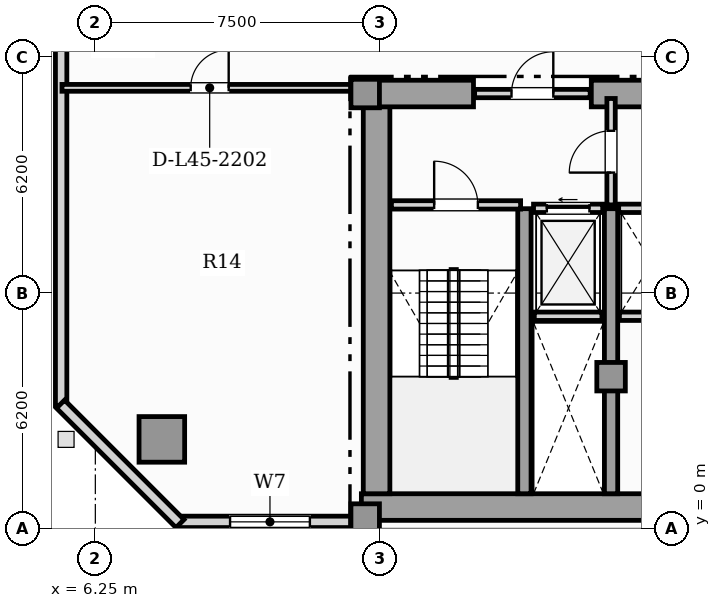
"""IFC4 building model, lengths in metres.
Left out: names, types, materials, properties, quantities, classifications, styles, units other than length and angle.
Written with IfcOpenShell. Run it as: python <this file> out.ifc"""

import sys

from ifc_helpers import new_model, si_unit, direction, frame, frame_2d, origin, origin_2d, place, context, subcontext, project, spatial, rectangle, hollow_rectangle, extrude, element, fill, save


model = new_model("IFC4")
c1 = context("Model", 3, precision=1e-05, world=origin(), true_north=direction((0.0, 1.0)))
c2 = subcontext(c1, "Body", "Model", "MODEL_VIEW")
j1 = project(units=[si_unit("LENGTHUNIT", "METRE"), si_unit("PLANEANGLEUNIT", "RADIAN")], contexts=[c1])
p1 = place(None, origin())
s1 = spatial("IfcSite", under=j1, at=p1, CompositionType="ELEMENT")
p2 = place(p1, origin())
s2 = spatial("IfcBuilding", under=s1, at=p2, CompositionType="ELEMENT")
p3 = place(p2, frame((0.0, 0.0, 183.7)))
s3 = spatial("IfcBuildingStorey", under=s2, at=p3, CompositionType="ELEMENT", Elevation=183.7)
p4 = place(p3, frame((13.25, 0.57, 0.0), z_axis=(0.0, 0.0, 1.0), x_axis=(1.0, 0.0, 0.0)))
e1 = element("IfcWall", 1, at=p4, inside=s3, PredefinedType="SHEAR", context=c2, shape_type="SweptSolid", body=[
    extrude(rectangle(XDim=31.0, YDim=0.7, at=frame_2d((15.5, 0.0))), origin(), (0.0, 0.0, 1.0), 3.63),
])
p5 = place(p3, frame((13.65, 0.92, 0.0), z_axis=(0.0, 0.0, 1.0), x_axis=(0.0, 1.0, 0.0)))
e2 = element("IfcWall", 2, at=p5, inside=s3, PredefinedType="SHEAR", context=c2, shape_type="SweptSolid", body=[
    extrude(rectangle(XDim=10.53, YDim=0.7, at=frame_2d((5.265, 0.0))), origin(), (0.0, 0.0, 1.0), 3.63),
])
p6 = place(p3, frame((13.25, 11.45, 0.0), z_axis=(0.0, 0.0, 1.0), x_axis=(1.0, 0.0, 0.0)))
e3 = element("IfcWall", 3, at=p6, inside=s3, PredefinedType="SHEAR", context=c2, shape_type="SweptSolid", body=[
    extrude(rectangle(XDim=2.95, YDim=0.7, at=frame_2d((1.475, 0.0))), origin(), (0.0, 0.0, 1.0), 3.63),
])
p7 = place(p3, frame((19.3, 11.45, 0.0), z_axis=(0.0, 0.0, 1.0), x_axis=(1.0, 0.0, 0.0)))
e4 = element("IfcWall", 4, at=p7, inside=s3, PredefinedType="SHEAR", context=c2, shape_type="SweptSolid", body=[
    extrude(rectangle(XDim=7.3, YDim=0.7, at=frame_2d((3.65, 0.0))), origin(), (0.0, 0.0, 1.0), 3.63),
])
for number, where, z_axis, x_axis in (
    (5, (17.54, 0.92, 0.0), (0.0, 0.0, 1.0), (0.0, 1.0, 0.0)),
    (6, (19.82, 0.92, 0.0), (0.0, 0.0, 1.0), (0.0, 1.0, 0.0)),
):
    element("IfcWall", number, at=place(p3, frame(where, z_axis=z_axis, x_axis=x_axis)), inside=s3, PredefinedType="SHEAR", context=c2, shape_type="SweptSolid", body=[
        extrude(rectangle(XDim=7.5, YDim=0.35, at=frame_2d((3.75, 0.0))), origin(), (0.0, 0.0, 1.0), 3.63),
    ])
for number, where, z_axis, x_axis in (
    (7, (13.35, 0.28, 0.0), (0.0, 0.0, 1.0), (1.0, 0.0, 0.0)),
    (8, (13.35, 11.45, 0.0), (0.0, 0.0, 1.0), (1.0, 0.0, 0.0)),
    (9, (19.82, 4.0, 0.0), (0.0, 0.0, 1.0), (1.0, 0.0, 0.0)),
):
    element("IfcColumn", number, at=place(p3, frame(where, z_axis=z_axis, x_axis=x_axis)), inside=s3, PredefinedType="COLUMN", context=c2, shape_type="SweptSolid", body=[
        extrude(rectangle(XDim=0.75, YDim=0.75, at=origin_2d()), origin(), (0.0, 0.0, 1.0), 3.85),
    ])
p8 = place(p3, frame((8.0, 2.35, 0.0), z_axis=(0.0, 0.0, 1.0), x_axis=(1.0, 0.0, 0.0)))
e10 = element("IfcColumn", 10, at=p8, inside=s3, PredefinedType="USERDEFINED", context=c2, shape_type="SweptSolid", body=[
    extrude(hollow_rectangle(XDim=1.2, YDim=1.2, WallThickness=0.07, at=origin_2d()), origin(), (0.0, 0.0, 1.0), 3.85),
])
p9 = place(p3, frame((8.44, 0.18, 0.0), z_axis=(0.0, 0.0, 1.0), x_axis=(1.0, 0.0, 0.0)))
e11 = element("IfcWall", 11, at=p9, inside=s3, PredefinedType="SOLIDWALL", context=c2, shape_type="SweptSolid", body=[
    extrude(rectangle(XDim=4.81, YDim=0.3, at=frame_2d((2.405, 0.0))), origin(), (0.0, 0.0, 1.0), 3.63),
])
p10 = place(p9, frame((1.355, 0.0, 0.85)))
e12 = element("IfcOpeningElement", 12, at=p10, cuts=e11, PredefinedType="OPENING", context=c2, shape_type="SweptSolid", body=[
    extrude(rectangle(XDim=2.1, YDim=2.05, at=frame_2d((1.05, 1.025))), frame((0.0, 0.16, 0.0), z_axis=(0.0, -1.0, 0.0), x_axis=(1.0, 0.0, 0.0)), (0.0, 0.0, 1.0), 0.32),
])
p11 = place(p3, frame((5.35, 37.16, 0.0), z_axis=(0.0, 0.0, 1.0), x_axis=(0.0, -1.0, 0.0)))
e13 = element("IfcWall", 13, at=p11, inside=s3, PredefinedType="SOLIDWALL", context=c2, shape_type="SweptSolid", body=[
    extrude(rectangle(XDim=33.92, YDim=0.3, at=frame_2d((16.96, 0.0))), origin(), (0.0, 0.0, 1.0), 3.63),
])
p12 = place(p11, frame((2.46, 0.0, 0.95)))
e14 = element("IfcOpeningElement", 14, at=p12, cuts=e13, PredefinedType="OPENING", context=c2, shape_type="SweptSolid", body=[
    extrude(rectangle(XDim=0.9, YDim=1.5, at=frame_2d((0.45, 0.75))), frame((0.0, 0.16, 0.0), z_axis=(0.0, -1.0, 0.0), x_axis=(1.0, 0.0, 0.0)), (0.0, 0.0, 1.0), 0.32),
])
p13 = place(p11, frame((11.241, 0.0, 0.88)))
e15 = element("IfcOpeningElement", 15, at=p13, cuts=e13, PredefinedType="OPENING", context=c2, shape_type="SweptSolid", body=[
    extrude(rectangle(XDim=1.65, YDim=2.0, at=frame_2d((0.825, 1.0))), frame((0.0, 0.16, 0.0), z_axis=(0.0, -1.0, 0.0), x_axis=(1.0, 0.0, 0.0)), (0.0, 0.0, 1.0), 0.32),
])
p14 = place(p3, frame((5.334, 3.278, 0.0), z_axis=(0.0, 0.0, 1.0), x_axis=(0.707106781187, -0.707106781187, 0.0)))
e16 = element("IfcWall", 16, at=p14, inside=s3, PredefinedType="SOLIDWALL", context=c2, shape_type="SweptSolid", body=[
    extrude(rectangle(XDim=4.445, YDim=0.3, at=frame_2d((2.223, 0.0))), origin(), (0.0, 0.0, 1.0), 3.63),
])
p15 = place(p3, frame((17.8, 5.59, 0.0), z_axis=(0.0, 0.0, 1.0), x_axis=(1.0, 0.0, 0.0)))
e17 = element("IfcWall", 17, at=p15, inside=s3, PredefinedType="SOLIDWALL", context=c2, shape_type="SweptSolid", body=[
    extrude(rectangle(XDim=1.78, YDim=0.22, at=frame_2d((0.89, 0.0))), origin(), (0.0, 0.0, 1.0), 3.63),
])
p16 = place(p3, frame((17.78, 8.43, 0.0), z_axis=(0.0, 0.0, 1.0), x_axis=(1.0, 0.0, 0.0)))
e18 = element("IfcWall", 18, at=p16, inside=s3, PredefinedType="SOLIDWALL", context=c2, shape_type="SweptSolid", body=[
    extrude(rectangle(XDim=1.82, YDim=0.22, at=frame_2d((0.91, 0.0))), origin(), (0.0, 0.0, 1.0), 3.63),
])
p17 = place(p16, frame((0.35, 0.0, 0.0)))
e19 = element("IfcOpeningElement", 19, at=p17, cuts=e18, PredefinedType="OPENING", context=c2, shape_type="SweptSolid", body=[
    extrude(rectangle(XDim=1.12, YDim=2.25, at=frame_2d((0.56, 1.125))), frame((0.0, 0.12, 0.0), z_axis=(0.0, -1.0, 0.0), x_axis=(1.0, 0.0, 0.0)), (0.0, 0.0, 1.0), 0.24),
])
p18 = place(p3, frame((20.04, 5.59, 0.0), z_axis=(0.0, 0.0, 1.0), x_axis=(1.0, 0.0, 0.0)))
e20 = element("IfcWall", 20, at=p18, inside=s3, PredefinedType="SOLIDWALL", context=c2, shape_type="SweptSolid", body=[
    extrude(rectangle(XDim=1.7, YDim=0.22, at=frame_2d((0.85, 0.0))), origin(), (0.0, 0.0, 1.0), 3.63),
])
p19 = place(p3, frame((20.02, 8.43, 0.0), z_axis=(0.0, 0.0, 1.0), x_axis=(1.0, 0.0, 0.0)))
e21 = element("IfcWall", 21, at=p19, inside=s3, PredefinedType="SOLIDWALL", context=c2, shape_type="SweptSolid", body=[
    extrude(rectangle(XDim=1.74, YDim=0.22, at=frame_2d((0.87, 0.0))), origin(), (0.0, 0.0, 1.0), 3.63),
])
p20 = place(p3, frame((14.04, 8.52, 0.0), z_axis=(0.0, 0.0, 1.0), x_axis=(1.0, 0.0, 0.0)))
e22 = element("IfcWall", 22, at=p20, inside=s3, PredefinedType="SOLIDWALL", context=c2, shape_type="SweptSolid", body=[
    extrude(rectangle(XDim=3.4, YDim=0.22, at=frame_2d((1.7, 0.0))), origin(), (0.0, 0.0, 1.0), 3.63),
])
p21 = place(p20, frame((1.125, 0.0, 0.0)))
e23 = element("IfcOpeningElement", 23, at=p21, cuts=e22, PredefinedType="OPENING", context=c2, shape_type="SweptSolid", body=[
    extrude(rectangle(XDim=1.15, YDim=2.2, at=frame_2d((0.575, 1.1))), frame((0.0, 0.12, 0.0), z_axis=(0.0, -1.0, 0.0), x_axis=(1.0, 0.0, 0.0)), (0.0, 0.0, 1.0), 0.24),
])
p22 = place(p3, frame((19.82, 8.52, 0.0), z_axis=(0.0, 0.0, 1.0), x_axis=(0.0, 1.0, 0.0)))
e24 = element("IfcWall", 24, at=p22, inside=s3, PredefinedType="SOLIDWALL", context=c2, shape_type="SweptSolid", body=[
    extrude(rectangle(XDim=2.8, YDim=0.22, at=frame_2d((1.4, 0.0))), origin(), (0.0, 0.0, 1.0), 3.085),
])
p23 = place(p22, frame((0.85, 0.0, 0.0)))
e25 = element("IfcOpeningElement", 25, at=p23, cuts=e24, PredefinedType="OPENING", context=c2, shape_type="SweptSolid", body=[
    extrude(rectangle(XDim=1.1, YDim=2.2, at=frame_2d((0.55, 1.1))), frame((0.0, 0.12, 0.0), z_axis=(0.0, -1.0, 0.0), x_axis=(1.0, 0.0, 0.0)), (0.0, 0.0, 1.0), 0.24),
])
p24 = place(p3, frame((16.23, 11.45, 0.0), z_axis=(0.0, 0.0, 1.0), x_axis=(1.0, 0.0, 0.0)))
e26 = element("IfcWall", 26, at=p24, inside=s3, PredefinedType="SOLIDWALL", context=c2, shape_type="SweptSolid", body=[
    extrude(rectangle(XDim=3.04, YDim=0.22, at=frame_2d((1.52, 0.0))), origin(), (0.0, 0.0, 1.0), 3.63),
])
p25 = place(p24, frame((0.97, 0.0, 0.0)))
e27 = element("IfcOpeningElement", 27, at=p25, cuts=e26, PredefinedType="OPENING", context=c2, shape_type="SweptSolid", body=[
    extrude(rectangle(XDim=1.1, YDim=2.2, at=frame_2d((0.55, 1.1))), frame((0.0, 0.12, 0.0), z_axis=(0.0, -1.0, 0.0), x_axis=(1.0, 0.0, 0.0)), (0.0, 0.0, 1.0), 0.24),
])
p26 = place(p3, frame((5.373, 11.6, 0.0), z_axis=(0.0, 0.0, 1.0), x_axis=(1.0, 0.0, 0.0)))
e28 = element("IfcWall", 28, at=p26, inside=s3, PredefinedType="PARTITIONING", context=c2, shape_type="SweptSolid", body=[
    extrude(rectangle(XDim=7.772, YDim=0.18, at=frame_2d((3.886, 0.0))), origin(), (0.0, 0.0, 1.0), 3.63),
])
p27 = place(p26, frame((3.386, 0.0, 0.0)))
e29 = element("IfcOpeningElement", 29, at=p27, cuts=e28, PredefinedType="OPENING", context=c2, shape_type="SweptSolid", body=[
    extrude(rectangle(XDim=1.0, YDim=2.15, at=frame_2d((0.5, 1.075))), frame((0.0, 0.1, 0.0), z_axis=(0.0, -1.0, 0.0), x_axis=(1.0, 0.0, 0.0)), (0.0, 0.0, 1.0), 0.2),
])
p28 = place(p10, origin())
e30 = element("IfcWindow", 30, at=p28, inside=s3, PartitioningType="SINGLE_PANEL", PredefinedType="WINDOW", context=c2, shape_type="SweptSolid", body=[
    extrude(rectangle(XDim=2.1, YDim=2.05, at=frame_2d((1.05, 1.025))), frame((0.0, 0.03, 0.0), z_axis=(0.0, -1.0, 0.0), x_axis=(1.0, 0.0, 0.0)), (0.0, 0.0, 1.0), 0.06),
])
fill(e12, e30)
p29 = place(p17, origin())
e31 = element("IfcDoor", 31, at=p29, inside=s3, OperationType="SLIDING_TO_LEFT", PredefinedType="DOOR", context=c2, shape_type="SweptSolid", body=[
    extrude(rectangle(XDim=1.12, YDim=2.25, at=frame_2d((0.56, 1.125))), frame((0.0, 0.025, 0.0), z_axis=(0.0, -1.0, 0.0), x_axis=(1.0, 0.0, 0.0)), (0.0, 0.0, 1.0), 0.05),
])
fill(e19, e31)
p30 = place(p21, origin())
e32 = element("IfcDoor", 32, at=p30, inside=s3, OperationType="SINGLE_SWING_LEFT", PredefinedType="DOOR", context=c2, shape_type="SweptSolid", body=[
    extrude(rectangle(XDim=1.15, YDim=2.2, at=frame_2d((0.575, 1.1))), frame((0.0, 0.025, 0.0), z_axis=(0.0, -1.0, 0.0), x_axis=(1.0, 0.0, 0.0)), (0.0, 0.0, 1.0), 0.05),
])
fill(e23, e32)
p31 = place(p23, origin())
e33 = element("IfcDoor", 33, at=p31, inside=s3, OperationType="SINGLE_SWING_LEFT", PredefinedType="DOOR", context=c2, shape_type="SweptSolid", body=[
    extrude(rectangle(XDim=1.1, YDim=2.2, at=frame_2d((0.55, 1.1))), frame((0.0, 0.025, 0.0), z_axis=(0.0, -1.0, 0.0), x_axis=(1.0, 0.0, 0.0)), (0.0, 0.0, 1.0), 0.05),
])
fill(e25, e33)
p32 = place(p25, origin())
e34 = element("IfcDoor", 34, at=p32, inside=s3, OperationType="SINGLE_SWING_RIGHT", PredefinedType="DOOR", context=c2, shape_type="SweptSolid", body=[
    extrude(rectangle(XDim=1.1, YDim=2.2, at=frame_2d((0.55, 1.1))), frame((0.0, 0.025, 0.0), z_axis=(0.0, -1.0, 0.0), x_axis=(1.0, 0.0, 0.0)), (0.0, 0.0, 1.0), 0.05),
])
fill(e27, e34)
p33 = place(p27, origin())
e35 = element("IfcDoor", 35, at=p33, inside=s3, OperationType="SINGLE_SWING_RIGHT", PredefinedType="DOOR", context=c2, shape_type="SweptSolid", body=[
    extrude(rectangle(XDim=1.0, YDim=2.15, at=frame_2d((0.5, 1.075))), frame((0.0, 0.025, 0.0), z_axis=(0.0, -1.0, 0.0), x_axis=(1.0, 0.0, 0.0)), (0.0, 0.0, 1.0), 0.05),
])
fill(e29, e35)
save(model, sys.argv[1])
